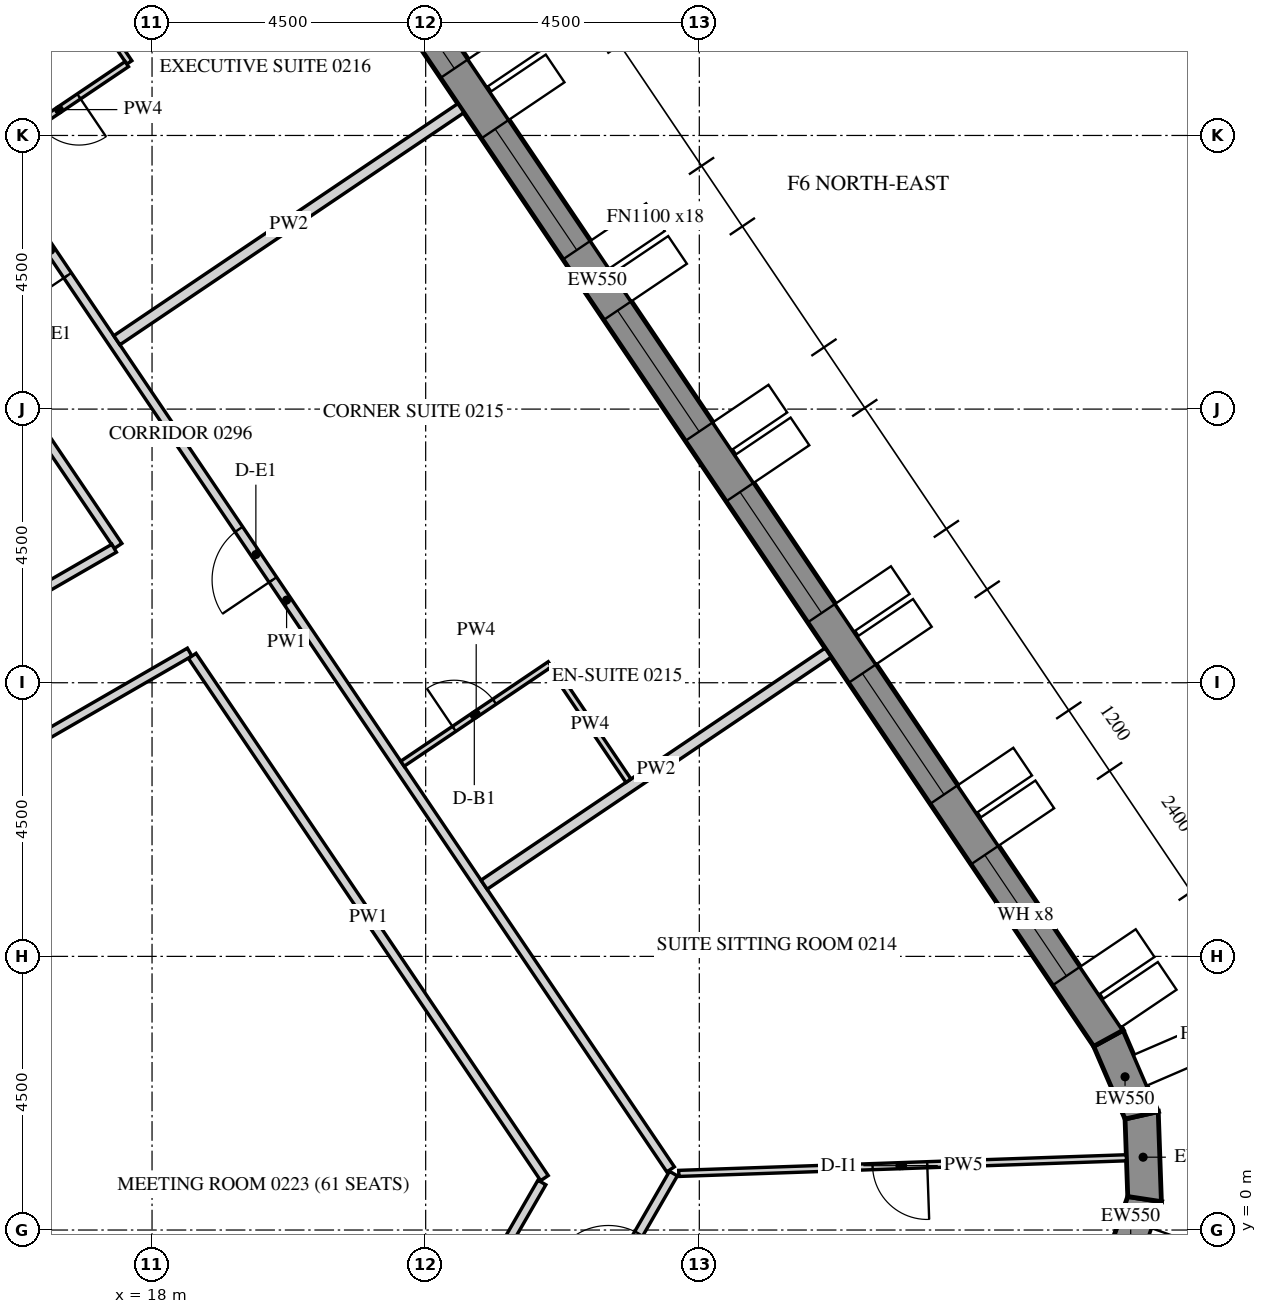
"""IFC4 building model, lengths in metres.
Left out: names, types, materials, properties, quantities, classifications, styles, units other than length and angle.
Written with IfcOpenShell. Run it as: python <this file> out.ifc"""

import sys

from ifc_helpers import new_model, si_unit, direction, frame, frame_2d, origin, place, context, subcontext, project, spatial, polyline, rectangle, outline, extrude, element, fill, save


model = new_model("IFC4")
c1 = context("Model", 3, precision=1e-05, world=origin(), true_north=direction((0.0, 1.0)))
c2 = subcontext(c1, "Body", "Model", "MODEL_VIEW")
j1 = project(units=[si_unit("LENGTHUNIT", "METRE"), si_unit("PLANEANGLEUNIT", "RADIAN")], contexts=[c1])
p1 = place(None, origin())
s1 = spatial("IfcSite", under=j1, at=p1, CompositionType="ELEMENT")
p2 = place(p1, origin())
s2 = spatial("IfcBuilding", under=s1, at=p2, CompositionType="ELEMENT")
p3 = place(p2, frame((0.0, 0.0, 49.2)))
s3 = spatial("IfcBuildingStorey", under=s2, at=p3, CompositionType="ELEMENT", Elevation=49.2)
p4 = place(p3, frame((33.866, -0.792, -0.15), z_axis=(0.0, 0.0, 1.0), x_axis=(0.33111537203, 0.943590276765, 0.0)))
e1 = element("IfcWall", 1, at=p4, inside=s3, PredefinedType="SOLIDWALL", context=c2, shape_type="SweptSolid", body=[
    extrude(outline(polyline([(-0.026, -0.275), (1.431, -0.275), (1.327, 0.275), (0.026, 0.275), (-0.026, -0.275)])), origin(), (0.0, 0.0, 1.0), 3.9),
])
p5 = place(p3, frame((34.323, 0.509, -0.15), z_axis=(0.0, 0.0, 1.0), x_axis=(-0.034876908462, 0.999391615562, 0.0)))
e2 = element("IfcWall", 2, at=p5, inside=s3, PredefinedType="SOLIDWALL", context=c2, shape_type="SweptSolid", body=[
    extrude(outline(polyline([(-0.052, -0.275), (1.431, -0.275), (1.327, 0.275), (0.052, 0.275), (-0.052, -0.275)])), origin(), (0.0, 0.0, 1.0), 3.9),
])
p6 = place(p3, frame((34.274, 1.887, -0.15), z_axis=(0.0, 0.0, 1.0), x_axis=(-0.396161342798, 0.918180913803, 0.0)))
e3 = element("IfcWall", 3, at=p6, inside=s3, PredefinedType="SOLIDWALL", context=c2, shape_type="SweptSolid", body=[
    extrude(outline(polyline([(-0.052, -0.275), (1.405, -0.275), (1.354, 0.275), (0.052, 0.275), (-0.052, -0.275)])), origin(), (0.0, 0.0, 1.0), 3.9),
])
p7 = place(p3, frame((33.728, 3.153, -0.15), z_axis=(0.0, 0.0, 1.0), x_axis=(-0.559192411416, 0.82903790445, 0.0)))
e4 = element("IfcWall", 4, at=p7, inside=s3, PredefinedType="SOLIDWALL", context=c2, shape_type="SweptSolid", body=[
    extrude(outline(polyline([(-0.026, -0.275), (30.093, -0.275), (30.048, 0.275), (0.026, 0.275), (-0.026, -0.275)])), origin(), (0.0, 0.0, 1.0), 3.9),
])
p8 = place(p7, frame((1.236, 0.0, 1.05)))
e5 = element("IfcOpeningElement", 5, at=p8, cuts=e4, PredefinedType="OPENING", context=c2, shape_type="SweptSolid", body=[
    extrude(rectangle(XDim=2.4, YDim=2.4, at=frame_2d((1.2, 1.2))), frame((0.0, 0.285, 0.0), z_axis=(0.0, -1.0, 0.0), x_axis=(1.0, 0.0, 0.0)), (0.0, 0.0, 1.0), 0.57),
])
p9 = place(p7, frame((4.835, 0.0, 1.05)))
e6 = element("IfcOpeningElement", 6, at=p9, cuts=e4, PredefinedType="OPENING", context=c2, shape_type="SweptSolid", body=[
    extrude(rectangle(XDim=2.4, YDim=2.4, at=frame_2d((1.2, 1.2))), frame((0.0, 0.285, 0.0), z_axis=(0.0, -1.0, 0.0), x_axis=(1.0, 0.0, 0.0)), (0.0, 0.0, 1.0), 0.57),
])
p10 = place(p7, frame((8.436, 0.0, 1.05)))
e7 = element("IfcOpeningElement", 7, at=p10, cuts=e4, PredefinedType="OPENING", context=c2, shape_type="SweptSolid", body=[
    extrude(rectangle(XDim=2.4, YDim=2.4, at=frame_2d((1.2, 1.2))), frame((0.0, 0.285, 0.0), z_axis=(0.0, -1.0, 0.0), x_axis=(1.0, 0.0, 0.0)), (0.0, 0.0, 1.0), 0.57),
])
p11 = place(p7, frame((12.035, 0.0, 1.05)))
e8 = element("IfcOpeningElement", 8, at=p11, cuts=e4, PredefinedType="OPENING", context=c2, shape_type="SweptSolid", body=[
    extrude(rectangle(XDim=2.4, YDim=2.4, at=frame_2d((1.2, 1.2))), frame((0.0, 0.285, 0.0), z_axis=(0.0, -1.0, 0.0), x_axis=(1.0, 0.0, 0.0)), (0.0, 0.0, 1.0), 0.57),
])
p12 = place(p7, frame((15.635, 0.0, 1.05)))
e9 = element("IfcOpeningElement", 9, at=p12, cuts=e4, PredefinedType="OPENING", context=c2, shape_type="SweptSolid", body=[
    extrude(rectangle(XDim=2.4, YDim=2.4, at=frame_2d((1.2, 1.2))), frame((0.0, 0.285, 0.0), z_axis=(0.0, -1.0, 0.0), x_axis=(1.0, 0.0, 0.0)), (0.0, 0.0, 1.0), 0.57),
])
p13 = place(p7, frame((19.236, 0.0, 1.05)))
e10 = element("IfcOpeningElement", 10, at=p13, cuts=e4, PredefinedType="OPENING", context=c2, shape_type="SweptSolid", body=[
    extrude(rectangle(XDim=2.4, YDim=2.4, at=frame_2d((1.2, 1.2))), frame((0.0, 0.285, 0.0), z_axis=(0.0, -1.0, 0.0), x_axis=(1.0, 0.0, 0.0)), (0.0, 0.0, 1.0), 0.57),
])
p14 = place(p7, frame((22.835, 0.0, 1.05)))
e11 = element("IfcOpeningElement", 11, at=p14, cuts=e4, PredefinedType="OPENING", context=c2, shape_type="SweptSolid", body=[
    extrude(rectangle(XDim=2.4, YDim=2.4, at=frame_2d((1.2, 1.2))), frame((0.0, 0.285, 0.0), z_axis=(0.0, -1.0, 0.0), x_axis=(1.0, 0.0, 0.0)), (0.0, 0.0, 1.0), 0.57),
])
p15 = place(p7, frame((26.436, 0.0, 1.05)))
e12 = element("IfcOpeningElement", 12, at=p15, cuts=e4, PredefinedType="OPENING", context=c2, shape_type="SweptSolid", body=[
    extrude(rectangle(XDim=2.4, YDim=2.4, at=frame_2d((1.2, 1.2))), frame((0.0, 0.285, 0.0), z_axis=(0.0, -1.0, 0.0), x_axis=(1.0, 0.0, 0.0)), (0.0, 0.0, 1.0), 0.57),
])
p16 = place(p3, frame((8.083, 14.0, -0.15), z_axis=(0.0, 0.0, 1.0), x_axis=(0.499997680643, 0.866026742862, 0.0)))
e13 = element("IfcWall", 13, at=p16, inside=s3, PredefinedType="SHEAR", context=c2, shape_type="SweptSolid", body=[
    extrude(rectangle(XDim=16.509, YDim=0.6, at=frame_2d((8.254, 0.0))), origin(), (0.0, 0.0, 1.0), 3.9),
])
p17 = place(p16, frame((7.354, 0.0, 0.15)))
e14 = element("IfcOpeningElement", 14, at=p17, cuts=e13, PredefinedType="OPENING", context=c2, shape_type="SweptSolid", body=[
    extrude(rectangle(XDim=1.8, YDim=2.4, at=frame_2d((0.9, 1.2))), frame((0.0, 0.31, 0.0), z_axis=(0.0, -1.0, 0.0), x_axis=(1.0, 0.0, 0.0)), (0.0, 0.0, 1.0), 0.62),
])
p18 = place(p3, frame((14.275, -20.375, 0.0), z_axis=(0.0, 0.0, 1.0), x_axis=(0.500001098408, 0.866024769617, 0.0)))
e15 = element("IfcWall", 15, at=p18, inside=s3, PredefinedType="PARTITIONING", context=c2, shape_type="SweptSolid", body=[
    extrude(rectangle(XDim=24.599, YDim=0.15, at=frame_2d((12.299, 0.0))), origin(), (0.0, 0.0, 1.0), 2.988),
])
p19 = place(p18, frame((3.016, 0.0, 0.0)))
e16 = element("IfcOpeningElement", 16, at=p19, cuts=e15, PredefinedType="OPENING", context=c2, shape_type="SweptSolid", body=[
    extrude(rectangle(XDim=1.0, YDim=2.1, at=frame_2d((0.5, 1.05))), frame((0.0, 0.085, 0.0), z_axis=(0.0, -1.0, 0.0), x_axis=(1.0, 0.0, 0.0)), (0.0, 0.0, 1.0), 0.17),
])
p20 = place(p18, frame((10.019, 0.0, 0.0)))
e17 = element("IfcOpeningElement", 17, at=p20, cuts=e15, PredefinedType="OPENING", context=c2, shape_type="SweptSolid", body=[
    extrude(rectangle(XDim=1.0, YDim=2.1, at=frame_2d((0.5, 1.05))), frame((0.0, 0.085, 0.0), z_axis=(0.0, -1.0, 0.0), x_axis=(1.0, 0.0, 0.0)), (0.0, 0.0, 1.0), 0.17),
])
p21 = place(p18, frame((22.459, 0.0, 0.0)))
e18 = element("IfcOpeningElement", 18, at=p21, cuts=e15, PredefinedType="OPENING", context=c2, shape_type="SweptSolid", body=[
    extrude(rectangle(XDim=1.0, YDim=2.1, at=frame_2d((0.5, 1.05))), frame((0.0, 0.085, 0.0), z_axis=(0.0, -1.0, 0.0), x_axis=(1.0, 0.0, 0.0)), (0.0, 0.0, 1.0), 0.17),
])
p22 = place(p3, frame((26.528, 0.997, 0.0), z_axis=(0.0, 0.0, 1.0), x_axis=(-0.559192121846, 0.829038099767, 0.0)))
e19 = element("IfcWall", 19, at=p22, inside=s3, PredefinedType="PARTITIONING", context=c2, shape_type="SweptSolid", body=[
    extrude(rectangle(XDim=22.586, YDim=0.15, at=frame_2d((11.293, 0.0))), origin(), (0.0, 0.0, 1.0), 2.988),
])
p23 = place(p22, frame((11.696, 0.0, 0.0)))
e20 = element("IfcOpeningElement", 20, at=p23, cuts=e19, PredefinedType="OPENING", context=c2, shape_type="SweptSolid", body=[
    extrude(rectangle(XDim=1.0, YDim=2.1, at=frame_2d((0.5, 1.05))), frame((0.0, 0.085, 0.0), z_axis=(0.0, -1.0, 0.0), x_axis=(1.0, 0.0, 0.0)), (0.0, 0.0, 1.0), 0.17),
])
p24 = place(p22, frame((17.733, 0.0, 0.0)))
e21 = element("IfcOpeningElement", 21, at=p24, cuts=e19, PredefinedType="OPENING", context=c2, shape_type="SweptSolid", body=[
    extrude(rectangle(XDim=1.0, YDim=2.1, at=frame_2d((0.5, 1.05))), frame((0.0, 0.085, 0.0), z_axis=(0.0, -1.0, 0.0), x_axis=(1.0, 0.0, 0.0)), (0.0, 0.0, 1.0), 0.17),
])
p25 = place(p3, frame((12.664, 6.066, 0.0), z_axis=(0.0, 0.0, 1.0), x_axis=(0.866027716353, 0.499995994493, 0.0)))
e22 = element("IfcWall", 22, at=p25, inside=s3, PredefinedType="PARTITIONING", context=c2, shape_type="SweptSolid", body=[
    extrude(rectangle(XDim=6.876, YDim=0.15, at=frame_2d((3.438, 0.0))), origin(), (0.0, 0.0, 1.0), 2.988),
])
p26 = place(p3, frame((18.661, 9.441, 0.0), z_axis=(0.0, 0.0, 1.0), x_axis=(0.559206469148, -0.829028422229, 0.0)))
e23 = element("IfcWall", 23, at=p26, inside=s3, PredefinedType="PARTITIONING", context=c2, shape_type="SweptSolid", body=[
    extrude(rectangle(XDim=10.358, YDim=0.15, at=frame_2d((5.179, 0.0))), origin(), (0.0, 0.0, 1.0), 2.988),
])
p27 = place(p3, frame((24.411, 0.782, 0.0), z_axis=(0.0, 0.0, 1.0), x_axis=(-0.499996383721, -0.866027491634, 0.0)))
e24 = element("IfcWall", 24, at=p27, inside=s3, PredefinedType="PARTITIONING", context=c2, shape_type="SweptSolid", body=[
    extrude(rectangle(XDim=11.804, YDim=0.15, at=frame_2d((5.902, 0.0))), origin(), (0.0, 0.0, 1.0), 2.988),
])
p28 = place(p27, frame((5.452, 0.0, 0.0)))
e25 = element("IfcOpeningElement", 25, at=p28, cuts=e24, PredefinedType="OPENING", context=c2, shape_type="SweptSolid", body=[
    extrude(rectangle(XDim=0.9, YDim=2.1, at=frame_2d((0.45, 1.05))), frame((0.0, 0.085, 0.0), z_axis=(0.0, -1.0, 0.0), x_axis=(1.0, 0.0, 0.0)), (0.0, 0.0, 1.0), 0.17),
])
p29 = place(p3, frame((11.798, 19.615, 0.0), z_axis=(0.0, 0.0, 1.0), x_axis=(0.559191941468, -0.829038221434, 0.0)))
e26 = element("IfcWall", 26, at=p29, inside=s3, PredefinedType="PARTITIONING", context=c2, shape_type="SweptSolid", body=[
    extrude(rectangle(XDim=10.092, YDim=0.15, at=frame_2d((5.046, 0.0))), origin(), (0.0, 0.0, 1.0), 2.988),
])
p30 = place(p29, frame((4.596, 0.0, 0.0)))
e27 = element("IfcOpeningElement", 27, at=p30, cuts=e26, PredefinedType="OPENING", context=c2, shape_type="SweptSolid", body=[
    extrude(rectangle(XDim=0.9, YDim=2.1, at=frame_2d((0.45, 1.05))), frame((0.0, 0.085, 0.0), z_axis=(0.0, -1.0, 0.0), x_axis=(1.0, 0.0, 0.0)), (0.0, 0.0, 1.0), 0.17),
])
p31 = place(p3, frame((17.376, 11.211, 0.0), z_axis=(0.0, 0.0, 1.0), x_axis=(-0.866021841149, -0.500006170614, 0.0)))
e28 = element("IfcWall", 28, at=p31, inside=s3, PredefinedType="PARTITIONING", context=c2, shape_type="SweptSolid", body=[
    extrude(rectangle(XDim=6.654, YDim=0.15, at=frame_2d((3.327, 0.0))), origin(), (0.0, 0.0, 1.0), 2.988),
])
p32 = place(p3, frame((34.023, 1.188, 0.0), z_axis=(0.0, 0.0, 1.0), x_axis=(-0.999390666539, -0.034904091936, 0.0)))
e29 = element("IfcWall", 29, at=p32, inside=s3, PredefinedType="PARTITIONING", context=c2, shape_type="SweptSolid", body=[
    extrude(rectangle(XDim=7.365, YDim=0.1, at=frame_2d((3.683, 0.0))), origin(), (0.0, 0.0, 1.0), 2.988),
])
p33 = place(p32, frame((3.277, 0.0, 0.0)))
e30 = element("IfcOpeningElement", 30, at=p33, cuts=e29, PredefinedType="OPENING", context=c2, shape_type="SweptSolid", body=[
    extrude(rectangle(XDim=0.9, YDim=2.1, at=frame_2d((0.45, 1.05))), frame((0.0, 0.06, 0.0), z_axis=(0.0, -1.0, 0.0), x_axis=(1.0, 0.0, 0.0)), (0.0, 0.0, 1.0), 0.12),
])
p34 = place(p3, frame((29.119, 9.495, 0.0), z_axis=(0.0, 0.0, 1.0), x_axis=(-0.829044361536, -0.559182838261, 0.0)))
e31 = element("IfcWall", 31, at=p34, inside=s3, PredefinedType="PARTITIONING", context=c2, shape_type="SweptSolid", body=[
    extrude(rectangle(XDim=6.825, YDim=0.18, at=frame_2d((3.413, 0.0))), origin(), (0.0, 0.0, 1.0), 2.988),
])
p35 = place(p3, frame((22.118, 7.668, 0.0), z_axis=(0.0, 0.0, 1.0), x_axis=(0.829007334469, 0.559237730663, 0.0)))
e32 = element("IfcWall", 32, at=p35, inside=s3, PredefinedType="PARTITIONING", context=c2, shape_type="SweptSolid", body=[
    extrude(rectangle(XDim=2.925, YDim=0.1, at=frame_2d((1.462, 0.0))), origin(), (0.0, 0.0, 1.0), 2.988),
])
p36 = place(p35, frame((1.025, 0.0, 0.0)))
e33 = element("IfcOpeningElement", 33, at=p36, cuts=e32, PredefinedType="OPENING", context=c2, shape_type="SweptSolid", body=[
    extrude(rectangle(XDim=0.8, YDim=2.1, at=frame_2d((0.4, 1.05))), frame((0.0, 0.06, 0.0), z_axis=(0.0, -1.0, 0.0), x_axis=(1.0, 0.0, 0.0)), (0.0, 0.0, 1.0), 0.12),
])
p37 = place(p3, frame((24.571, 9.262, 0.0), z_axis=(0.0, 0.0, 1.0), x_axis=(0.559179660023, -0.829046505219, 0.0)))
e34 = element("IfcWall", 34, at=p37, inside=s3, PredefinedType="PARTITIONING", context=c2, shape_type="SweptSolid", body=[
    extrude(rectangle(XDim=2.26, YDim=0.1, at=frame_2d((1.13, 0.0))), origin(), (0.0, 0.0, 1.0), 2.988),
])
p38 = place(p3, frame((23.079, 18.449, 0.0), z_axis=(0.0, 0.0, 1.0), x_axis=(-0.829044361536, -0.559182838261, 0.0)))
e35 = element("IfcWall", 35, at=p38, inside=s3, PredefinedType="PARTITIONING", context=c2, shape_type="SweptSolid", body=[
    extrude(rectangle(XDim=6.825, YDim=0.18, at=frame_2d((3.413, 0.0))), origin(), (0.0, 0.0, 1.0), 2.988),
])
p39 = place(p3, frame((16.2, 21.315, 0.0), z_axis=(0.0, 0.0, 1.0), x_axis=(0.559155442782, -0.829062838878, 0.0)))
e36 = element("IfcWall", 36, at=p39, inside=s3, PredefinedType="PARTITIONING", context=c2, shape_type="SweptSolid", body=[
    extrude(rectangle(XDim=2.55, YDim=0.1, at=frame_2d((1.275, 0.0))), origin(), (0.0, 0.0, 1.0), 2.988),
])
p40 = place(p3, frame((17.585, 19.173, 0.0), z_axis=(0.0, 0.0, 1.0), x_axis=(-0.82904753069, -0.559178139645, 0.0)))
e37 = element("IfcWall", 37, at=p40, inside=s3, PredefinedType="PARTITIONING", context=c2, shape_type="SweptSolid", body=[
    extrude(rectangle(XDim=2.675, YDim=0.1, at=frame_2d((1.337, 0.0))), origin(), (0.0, 0.0, 1.0), 2.988),
])
p41 = place(p40, frame((0.95, 0.0, 0.0)))
e38 = element("IfcOpeningElement", 38, at=p41, cuts=e37, PredefinedType="OPENING", context=c2, shape_type="SweptSolid", body=[
    extrude(rectangle(XDim=0.8, YDim=2.1, at=frame_2d((0.4, 1.05))), frame((0.0, 0.06, 0.0), z_axis=(0.0, -1.0, 0.0), x_axis=(1.0, 0.0, 0.0)), (0.0, 0.0, 1.0), 0.12),
])
p42 = place(p8, frame((0.0, 0.205, 0.0)))
e39 = element("IfcWindow", 39, at=p42, inside=s3, PartitioningType="DOUBLE_PANEL_VERTICAL", PredefinedType="WINDOW", context=c2, shape_type="SweptSolid", body=[
    extrude(rectangle(XDim=2.4, YDim=2.4, at=frame_2d((1.2, 1.2))), frame((0.0, 0.03, 0.0), z_axis=(0.0, -1.0, 0.0), x_axis=(1.0, 0.0, 0.0)), (0.0, 0.0, 1.0), 0.06),
])
fill(e5, e39)
p43 = place(p9, frame((0.0, 0.205, 0.0)))
e40 = element("IfcWindow", 40, at=p43, inside=s3, PartitioningType="DOUBLE_PANEL_VERTICAL", PredefinedType="WINDOW", context=c2, shape_type="SweptSolid", body=[
    extrude(rectangle(XDim=2.4, YDim=2.4, at=frame_2d((1.2, 1.2))), frame((0.0, 0.03, 0.0), z_axis=(0.0, -1.0, 0.0), x_axis=(1.0, 0.0, 0.0)), (0.0, 0.0, 1.0), 0.06),
])
fill(e6, e40)
p44 = place(p10, frame((0.0, 0.205, 0.0)))
e41 = element("IfcWindow", 41, at=p44, inside=s3, PartitioningType="DOUBLE_PANEL_VERTICAL", PredefinedType="WINDOW", context=c2, shape_type="SweptSolid", body=[
    extrude(rectangle(XDim=2.4, YDim=2.4, at=frame_2d((1.2, 1.2))), frame((0.0, 0.03, 0.0), z_axis=(0.0, -1.0, 0.0), x_axis=(1.0, 0.0, 0.0)), (0.0, 0.0, 1.0), 0.06),
])
fill(e7, e41)
p45 = place(p11, frame((0.0, 0.205, 0.0)))
e42 = element("IfcWindow", 42, at=p45, inside=s3, PartitioningType="DOUBLE_PANEL_VERTICAL", PredefinedType="WINDOW", context=c2, shape_type="SweptSolid", body=[
    extrude(rectangle(XDim=2.4, YDim=2.4, at=frame_2d((1.2, 1.2))), frame((0.0, 0.03, 0.0), z_axis=(0.0, -1.0, 0.0), x_axis=(1.0, 0.0, 0.0)), (0.0, 0.0, 1.0), 0.06),
])
fill(e8, e42)
p46 = place(p12, frame((0.0, 0.205, 0.0)))
e43 = element("IfcWindow", 43, at=p46, inside=s3, PartitioningType="DOUBLE_PANEL_VERTICAL", PredefinedType="WINDOW", context=c2, shape_type="SweptSolid", body=[
    extrude(rectangle(XDim=2.4, YDim=2.4, at=frame_2d((1.2, 1.2))), frame((0.0, 0.03, 0.0), z_axis=(0.0, -1.0, 0.0), x_axis=(1.0, 0.0, 0.0)), (0.0, 0.0, 1.0), 0.06),
])
fill(e9, e43)
p47 = place(p13, frame((0.0, 0.205, 0.0)))
e44 = element("IfcWindow", 44, at=p47, inside=s3, PartitioningType="DOUBLE_PANEL_VERTICAL", PredefinedType="WINDOW", context=c2, shape_type="SweptSolid", body=[
    extrude(rectangle(XDim=2.4, YDim=2.4, at=frame_2d((1.2, 1.2))), frame((0.0, 0.03, 0.0), z_axis=(0.0, -1.0, 0.0), x_axis=(1.0, 0.0, 0.0)), (0.0, 0.0, 1.0), 0.06),
])
fill(e10, e44)
p48 = place(p21, origin())
e45 = element("IfcDoor", 45, at=p48, inside=s3, OperationType="SINGLE_SWING_LEFT", PredefinedType="DOOR", context=c2, shape_type="SweptSolid", body=[
    extrude(rectangle(XDim=1.0, YDim=2.1, at=frame_2d((0.5, 1.05))), frame((0.0, 0.025, 0.0), z_axis=(0.0, -1.0, 0.0), x_axis=(1.0, 0.0, 0.0)), (0.0, 0.0, 1.0), 0.05),
])
fill(e18, e45)
p49 = place(p33, origin())
e46 = element("IfcDoor", 46, at=p49, inside=s3, OperationType="SINGLE_SWING_LEFT", PredefinedType="DOOR", context=c2, shape_type="SweptSolid", body=[
    extrude(rectangle(XDim=0.9, YDim=2.1, at=frame_2d((0.45, 1.05))), frame((0.0, 0.025, 0.0), z_axis=(0.0, -1.0, 0.0), x_axis=(1.0, 0.0, 0.0)), (0.0, 0.0, 1.0), 0.05),
])
fill(e30, e46)
p50 = place(p23, origin())
e47 = element("IfcDoor", 47, at=p50, inside=s3, OperationType="SINGLE_SWING_RIGHT", PredefinedType="DOOR", context=c2, shape_type="SweptSolid", body=[
    extrude(rectangle(XDim=1.0, YDim=2.1, at=frame_2d((0.5, 1.05))), frame((0.0, 0.025, 0.0), z_axis=(0.0, -1.0, 0.0), x_axis=(1.0, 0.0, 0.0)), (0.0, 0.0, 1.0), 0.05),
])
fill(e20, e47)
p51 = place(p36, origin())
e48 = element("IfcDoor", 48, at=p51, inside=s3, OperationType="SINGLE_SWING_RIGHT", PredefinedType="DOOR", context=c2, shape_type="SweptSolid", body=[
    extrude(rectangle(XDim=0.8, YDim=2.1, at=frame_2d((0.4, 1.05))), frame((0.0, 0.025, 0.0), z_axis=(0.0, -1.0, 0.0), x_axis=(1.0, 0.0, 0.0)), (0.0, 0.0, 1.0), 0.05),
])
fill(e33, e48)
p52 = place(p24, origin())
e49 = element("IfcDoor", 49, at=p52, inside=s3, OperationType="SINGLE_SWING_LEFT", PredefinedType="DOOR", context=c2, shape_type="SweptSolid", body=[
    extrude(rectangle(XDim=1.0, YDim=2.1, at=frame_2d((0.5, 1.05))), frame((0.0, 0.025, 0.0), z_axis=(0.0, -1.0, 0.0), x_axis=(1.0, 0.0, 0.0)), (0.0, 0.0, 1.0), 0.05),
])
fill(e21, e49)
p53 = place(p41, origin())
e50 = element("IfcDoor", 50, at=p53, inside=s3, OperationType="SINGLE_SWING_RIGHT", PredefinedType="DOOR", context=c2, shape_type="SweptSolid", body=[
    extrude(rectangle(XDim=0.8, YDim=2.1, at=frame_2d((0.4, 1.05))), frame((0.0, 0.025, 0.0), z_axis=(0.0, -1.0, 0.0), x_axis=(1.0, 0.0, 0.0)), (0.0, 0.0, 1.0), 0.05),
])
fill(e38, e50)
save(model, sys.argv[1])
